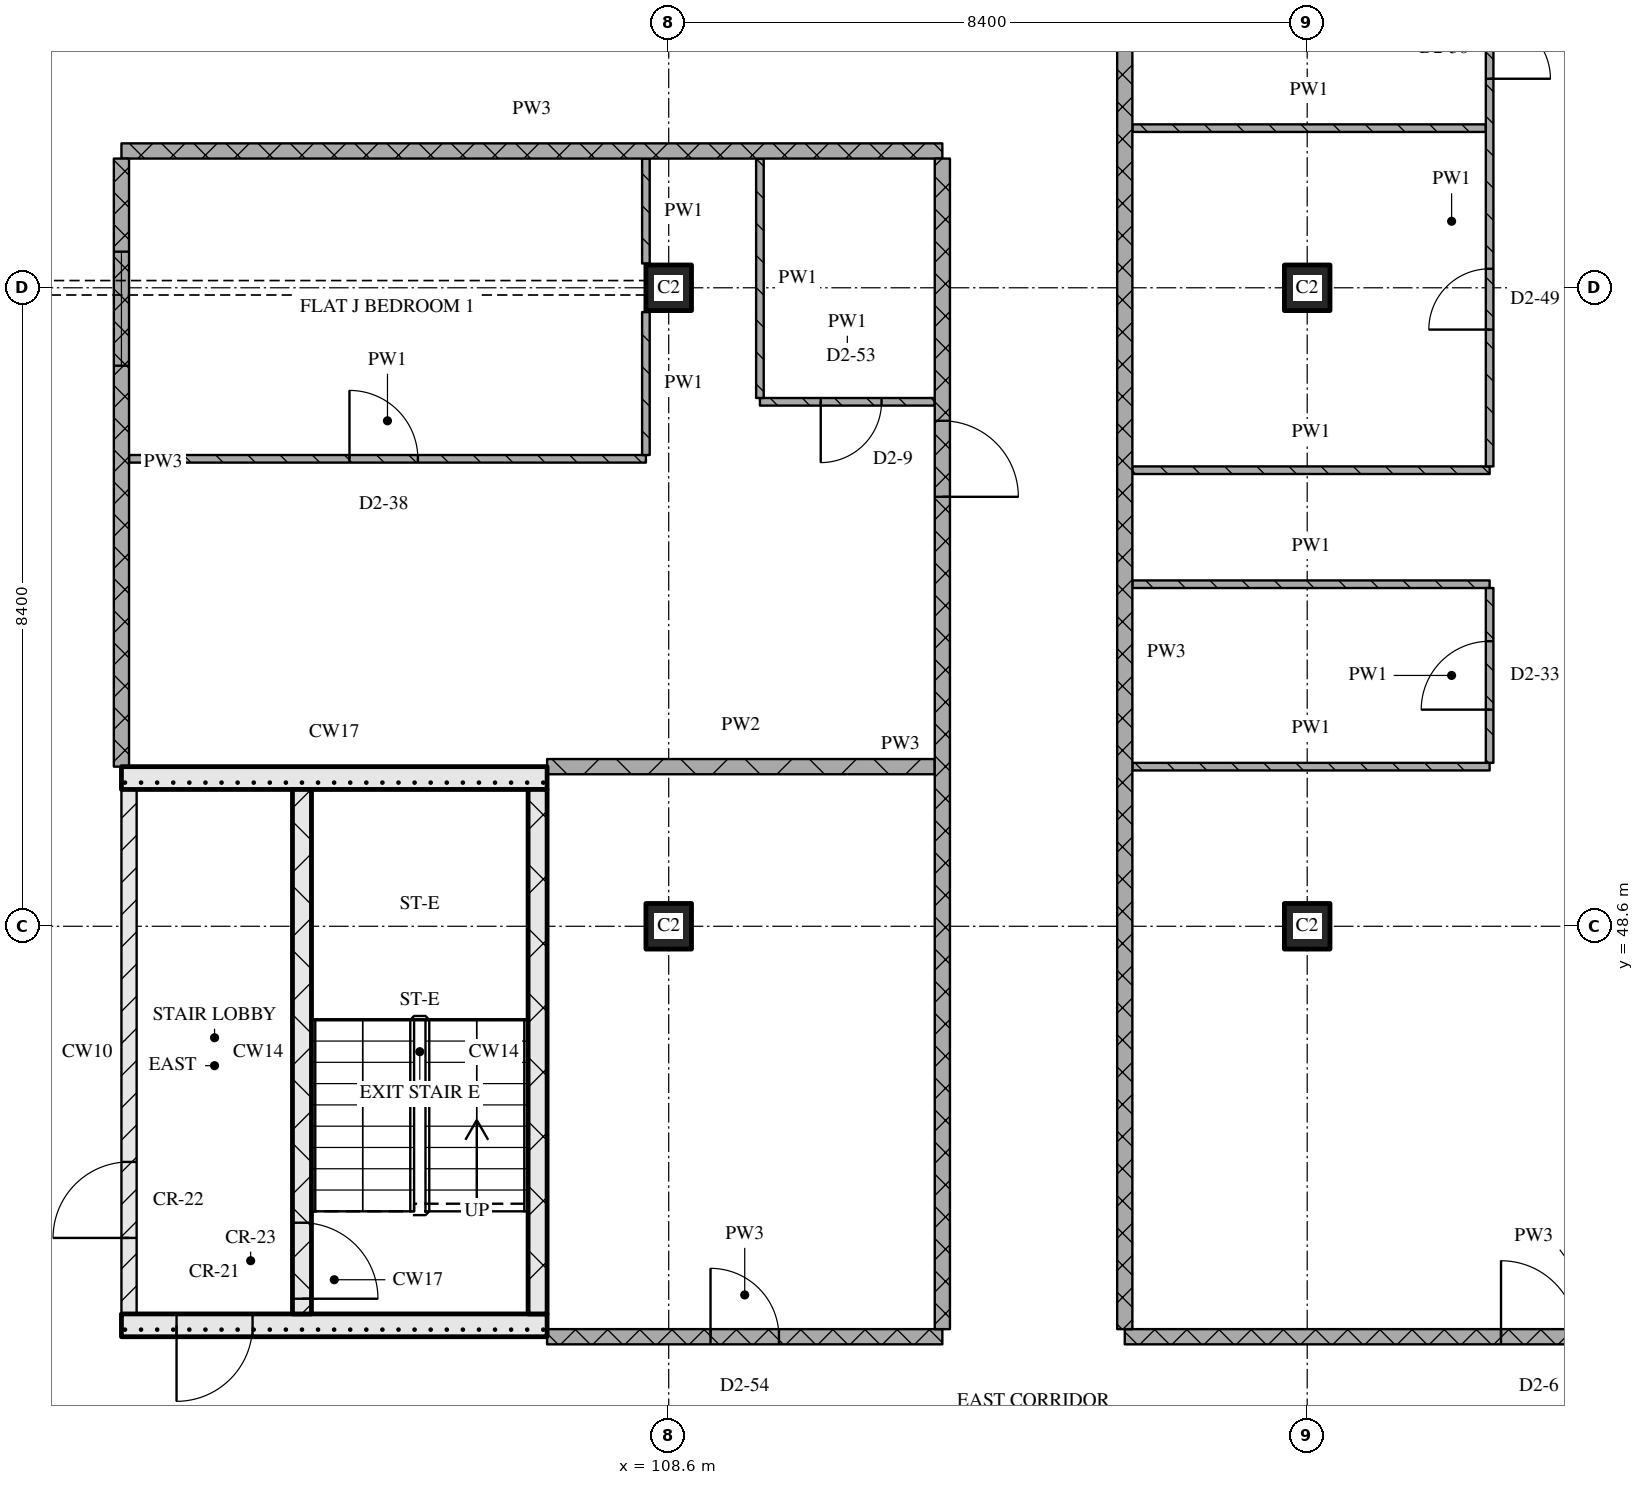
"""IFC4 building model, lengths in metres.
Left out: names, types, materials, properties, quantities, classifications, styles, units other than length and angle.
Written with IfcOpenShell. Run it as: python <this file> out.ifc"""

import sys

from ifc_helpers import new_model, si_unit, direction, frame, frame_2d, origin, origin_2d, place, context, subcontext, project, spatial, rectangle, extrude, element, fill, save


model = new_model("IFC4")
c1 = context("Model", 3, precision=1e-05, world=origin(), true_north=direction((0.0, 1.0)))
c2 = subcontext(c1, "Body", "Model", "MODEL_VIEW")
j1 = project(units=[si_unit("LENGTHUNIT", "METRE"), si_unit("PLANEANGLEUNIT", "RADIAN")], contexts=[c1])
p1 = place(None, origin())
s1 = spatial("IfcSite", under=j1, at=p1, CompositionType="ELEMENT")
p2 = place(p1, origin())
s2 = spatial("IfcBuilding", under=s1, at=p2, CompositionType="ELEMENT")
p3 = place(p2, frame((0.0, 0.0, 219.9)))
s3 = spatial("IfcBuildingStorey", under=s2, at=p3, CompositionType="ELEMENT", Elevation=219.9)
for number, where, z_axis, x_axis in (
    (1, (108.6, 48.6, 0.0), (0.0, 0.0, 1.0), (1.0, 0.0, 0.0)),
    (2, (108.6, 57.0, 0.0), (0.0, 0.0, 1.0), (1.0, 0.0, 0.0)),
    (3, (117.0, 48.6, 0.0), (0.0, 0.0, 1.0), (1.0, 0.0, 0.0)),
    (4, (117.0, 57.0, 0.0), (0.0, 0.0, 1.0), (1.0, 0.0, 0.0)),
):
    element("IfcColumn", number, at=place(p3, frame(where, z_axis=z_axis, x_axis=x_axis)), inside=s3, PredefinedType="COLUMN", context=c2, shape_type="SweptSolid", body=[
        extrude(rectangle(XDim=0.6, YDim=0.6, at=origin_2d()), origin(), (0.0, 0.0, 1.0), 3.6),
    ])
p4 = place(p3, frame((101.4, 43.35, 0.0), z_axis=(0.0, 0.0, 1.0), x_axis=(1.0, 0.0, 0.0)))
e5 = element("IfcWall", 5, at=p4, inside=s3, PredefinedType="SOLIDWALL", context=c2, shape_type="SweptSolid", body=[
    extrude(rectangle(XDim=5.6, YDim=0.3, at=frame_2d((2.8, 0.0))), origin(), (0.0, 0.0, 1.0), 3.32),
])
p5 = place(p4, frame((0.725, 0.0, 0.0)))
e6 = element("IfcOpeningElement", 6, at=p5, cuts=e5, PredefinedType="OPENING", context=c2, shape_type="SweptSolid", body=[
    extrude(rectangle(XDim=1.0, YDim=2.1, at=frame_2d((0.5, 1.05))), frame((0.0, 0.16, 0.0), z_axis=(0.0, -1.0, 0.0), x_axis=(1.0, 0.0, 0.0)), (0.0, 0.0, 1.0), 0.32),
])
p6 = place(p3, frame((101.5, 43.5, 0.0), z_axis=(0.0, 0.0, 1.0), x_axis=(0.0, 1.0, 0.0)))
e7 = element("IfcWall", 7, at=p6, inside=s3, PredefinedType="PARTITIONING", context=c2, shape_type="SweptSolid", body=[
    extrude(rectangle(XDim=6.9, YDim=0.2, at=frame_2d((3.45, 0.0))), origin(), (0.0, 0.0, 1.0), 3.32),
])
p7 = place(p6, frame((1.0, 0.0, 0.0)))
e8 = element("IfcOpeningElement", 8, at=p7, cuts=e7, PredefinedType="OPENING", context=c2, shape_type="SweptSolid", body=[
    extrude(rectangle(XDim=1.0, YDim=2.1, at=frame_2d((0.5, 1.05))), frame((0.0, 0.11, 0.0), z_axis=(0.0, -1.0, 0.0), x_axis=(1.0, 0.0, 0.0)), (0.0, 0.0, 1.0), 0.22),
])
p8 = place(p3, frame((103.775, 43.5, 0.0), z_axis=(0.0, 0.0, 1.0), x_axis=(0.0, 1.0, 0.0)))
e9 = element("IfcWall", 9, at=p8, inside=s3, PredefinedType="SOLIDWALL", context=c2, shape_type="SweptSolid", body=[
    extrude(rectangle(XDim=6.9, YDim=0.25, at=frame_2d((3.45, 0.0))), origin(), (0.0, 0.0, 1.0), 3.32),
])
p9 = place(p8, frame((0.2, 0.0, 0.0)))
e10 = element("IfcOpeningElement", 10, at=p9, cuts=e9, PredefinedType="OPENING", context=c2, shape_type="SweptSolid", body=[
    extrude(rectangle(XDim=1.0, YDim=2.1, at=frame_2d((0.5, 1.05))), frame((0.0, 0.135, 0.0), z_axis=(0.0, -1.0, 0.0), x_axis=(1.0, 0.0, 0.0)), (0.0, 0.0, 1.0), 0.27),
])
p10 = place(p3, frame((106.875, 43.5, 0.0), z_axis=(0.0, 0.0, 1.0), x_axis=(0.0, 1.0, 0.0)))
e11 = element("IfcWall", 11, at=p10, inside=s3, PredefinedType="SOLIDWALL", context=c2, shape_type="SweptSolid", body=[
    extrude(rectangle(XDim=6.9, YDim=0.25, at=frame_2d((3.45, 0.0))), origin(), (0.0, 0.0, 1.0), 3.32),
])
p11 = place(p3, frame((101.4, 50.55, 0.0), z_axis=(0.0, 0.0, 1.0), x_axis=(1.0, 0.0, 0.0)))
e12 = element("IfcWall", 12, at=p11, inside=s3, PredefinedType="SOLIDWALL", context=c2, shape_type="SweptSolid", body=[
    extrude(rectangle(XDim=5.6, YDim=0.3, at=frame_2d((2.8, 0.0))), origin(), (0.0, 0.0, 1.0), 3.32),
])
p12 = place(p3, frame((107.0, 43.2, 0.0), z_axis=(0.0, 0.0, 1.0), x_axis=(1.0, 0.0, 0.0)))
e13 = element("IfcWall", 13, at=p12, inside=s3, PredefinedType="PARTITIONING", context=c2, shape_type="SweptSolid", body=[
    extrude(rectangle(XDim=5.2, YDim=0.2, at=frame_2d((2.6, 0.0))), origin(), (0.0, 0.0, 1.0), 3.32),
])
p13 = place(p12, frame((2.15, 0.0, 0.0)))
e14 = element("IfcOpeningElement", 14, at=p13, cuts=e13, PredefinedType="OPENING", context=c2, shape_type="SweptSolid", body=[
    extrude(rectangle(XDim=0.9, YDim=2.1, at=frame_2d((0.45, 1.05))), frame((0.0, 0.11, 0.0), z_axis=(0.0, -1.0, 0.0), x_axis=(1.0, 0.0, 0.0)), (0.0, 0.0, 1.0), 0.22),
])
p14 = place(p3, frame((114.6, 43.2, 0.0), z_axis=(0.0, 0.0, 1.0), x_axis=(1.0, 0.0, 0.0)))
e15 = element("IfcWall", 15, at=p14, inside=s3, PredefinedType="PARTITIONING", context=c2, shape_type="SweptSolid", body=[
    extrude(rectangle(XDim=12.32, YDim=0.2, at=frame_2d((6.16, 0.0))), origin(), (0.0, 0.0, 1.0), 3.32),
])
p15 = place(p14, frame((4.95, 0.0, 0.0)))
e16 = element("IfcOpeningElement", 16, at=p15, cuts=e15, PredefinedType="OPENING", context=c2, shape_type="SweptSolid", body=[
    extrude(rectangle(XDim=1.0, YDim=2.1, at=frame_2d((0.5, 1.05))), frame((0.0, 0.11, 0.0), z_axis=(0.0, -1.0, 0.0), x_axis=(1.0, 0.0, 0.0)), (0.0, 0.0, 1.0), 0.22),
])
p16 = place(p3, frame((107.0, 50.7, 0.0), z_axis=(0.0, 0.0, 1.0), x_axis=(1.0, 0.0, 0.0)))
e17 = element("IfcWall", 17, at=p16, inside=s3, PredefinedType="PARTITIONING", context=c2, shape_type="SweptSolid", body=[
    extrude(rectangle(XDim=5.1, YDim=0.2, at=frame_2d((2.55, 0.0))), origin(), (0.0, 0.0, 1.0), 3.32),
])
for number, where, z_axis, x_axis in (
    (18, (114.7, 50.7, 0.0), (0.0, 0.0, 1.0), (1.0, 0.0, 0.0)),
    (19, (114.7, 53.1, 0.0), (0.0, 0.0, 1.0), (1.0, 0.0, 0.0)),
    (20, (114.7, 54.6, 0.0), (0.0, 0.0, 1.0), (1.0, 0.0, 0.0)),
):
    element("IfcWall", number, at=place(p3, frame(where, z_axis=z_axis, x_axis=x_axis)), inside=s3, PredefinedType="PARTITIONING", context=c2, shape_type="SweptSolid", body=[
        extrude(rectangle(XDim=4.7, YDim=0.1, at=frame_2d((2.35, 0.0))), origin(), (0.0, 0.0, 1.0), 3.32),
    ])
p17 = place(p3, frame((101.5, 54.75, 0.0), z_axis=(0.0, 0.0, 1.0), x_axis=(1.0, 0.0, 0.0)))
e21 = element("IfcWall", 21, at=p17, inside=s3, PredefinedType="PARTITIONING", context=c2, shape_type="SweptSolid", body=[
    extrude(rectangle(XDim=6.8, YDim=0.1, at=frame_2d((3.4, 0.0))), origin(), (0.0, 0.0, 1.0), 3.32),
])
p18 = place(p17, frame((2.9, 0.0, 0.0)))
e22 = element("IfcOpeningElement", 22, at=p18, cuts=e21, PredefinedType="OPENING", context=c2, shape_type="SweptSolid", body=[
    extrude(rectangle(XDim=0.9, YDim=2.1, at=frame_2d((0.45, 1.05))), frame((0.0, 0.06, 0.0), z_axis=(0.0, -1.0, 0.0), x_axis=(1.0, 0.0, 0.0)), (0.0, 0.0, 1.0), 0.12),
])
p19 = place(p3, frame((109.8, 55.5, 0.0), z_axis=(0.0, 0.0, 1.0), x_axis=(1.0, 0.0, 0.0)))
e23 = element("IfcWall", 23, at=p19, inside=s3, PredefinedType="PARTITIONING", context=c2, shape_type="SweptSolid", body=[
    extrude(rectangle(XDim=2.3, YDim=0.1, at=frame_2d((1.15, 0.0))), origin(), (0.0, 0.0, 1.0), 3.32),
])
p20 = place(p19, frame((0.8, 0.0, 0.0)))
e24 = element("IfcOpeningElement", 24, at=p20, cuts=e23, PredefinedType="OPENING", context=c2, shape_type="SweptSolid", body=[
    extrude(rectangle(XDim=0.8, YDim=2.1, at=frame_2d((0.4, 1.05))), frame((0.0, 0.06, 0.0), z_axis=(0.0, -1.0, 0.0), x_axis=(1.0, 0.0, 0.0)), (0.0, 0.0, 1.0), 0.12),
])
p21 = place(p3, frame((101.4, 58.8, 0.0), z_axis=(0.0, 0.0, 1.0), x_axis=(1.0, 0.0, 0.0)))
e25 = element("IfcWall", 25, at=p21, inside=s3, PredefinedType="PARTITIONING", context=c2, shape_type="SweptSolid", body=[
    extrude(rectangle(XDim=10.8, YDim=0.2, at=frame_2d((5.4, 0.0))), origin(), (0.0, 0.0, 1.0), 3.32),
])
p22 = place(p3, frame((114.7, 59.1, 0.0), z_axis=(0.0, 0.0, 1.0), x_axis=(1.0, 0.0, 0.0)))
e26 = element("IfcWall", 26, at=p22, inside=s3, PredefinedType="PARTITIONING", context=c2, shape_type="SweptSolid", body=[
    extrude(rectangle(XDim=4.65, YDim=0.1, at=frame_2d((2.325, 0.0))), origin(), (0.0, 0.0, 1.0), 3.32),
])
p23 = place(p3, frame((101.4, 58.7, 0.0), z_axis=(0.0, 0.0, 1.0), x_axis=(0.0, -1.0, 0.0)))
e27 = element("IfcWall", 27, at=p23, inside=s3, PredefinedType="PARTITIONING", context=c2, shape_type="SweptSolid", body=[
    extrude(rectangle(XDim=8.0, YDim=0.2, at=frame_2d((4.0, 0.0))), origin(), (0.0, 0.0, 1.0), 3.32),
])
p24 = place(p23, frame((1.225, 0.0, 0.9)))
e28 = element("IfcOpeningElement", 28, at=p24, cuts=e27, PredefinedType="OPENING", context=c2, shape_type="SweptSolid", body=[
    extrude(rectangle(XDim=1.5, YDim=1.5, at=frame_2d((0.75, 0.75))), frame((0.0, 0.11, 0.0), z_axis=(0.0, -1.0, 0.0), x_axis=(1.0, 0.0, 0.0)), (0.0, 0.0, 1.0), 0.22),
])
p25 = place(p3, frame((108.3, 56.68, 0.0), z_axis=(0.0, 0.0, 1.0), x_axis=(0.0, -1.0, 0.0)))
e29 = element("IfcWall", 29, at=p25, inside=s3, PredefinedType="PARTITIONING", context=c2, shape_type="SweptSolid", body=[
    extrude(rectangle(XDim=1.88, YDim=0.1, at=frame_2d((0.94, 0.0))), origin(), (0.0, 0.0, 1.0), 3.32),
])
p26 = place(p3, frame((108.3, 58.7, 0.0), z_axis=(0.0, 0.0, 1.0), x_axis=(0.0, -1.0, 0.0)))
e30 = element("IfcWall", 30, at=p26, inside=s3, PredefinedType="PARTITIONING", context=c2, shape_type="SweptSolid", body=[
    extrude(rectangle(XDim=1.38, YDim=0.1, at=frame_2d((0.69, 0.0))), origin(), (0.0, 0.0, 1.0), 3.32),
])
p27 = place(p3, frame((109.8, 58.7, 0.0), z_axis=(0.0, 0.0, 1.0), x_axis=(0.0, -1.0, 0.0)))
e31 = element("IfcWall", 31, at=p27, inside=s3, PredefinedType="PARTITIONING", context=c2, shape_type="SweptSolid", body=[
    extrude(rectangle(XDim=3.15, YDim=0.1, at=frame_2d((1.575, 0.0))), origin(), (0.0, 0.0, 1.0), 3.32),
])
p28 = place(p3, frame((112.2, 43.3, 0.0), z_axis=(0.0, 0.0, 1.0), x_axis=(0.0, 1.0, 0.0)))
e32 = element("IfcWall", 32, at=p28, inside=s3, PredefinedType="PARTITIONING", context=c2, shape_type="SweptSolid", body=[
    extrude(rectangle(XDim=15.4, YDim=0.2, at=frame_2d((7.7, 0.0))), origin(), (0.0, 0.0, 1.0), 3.32),
])
p29 = place(p28, frame((10.95, 0.0, 0.0)))
e33 = element("IfcOpeningElement", 33, at=p29, cuts=e32, PredefinedType="OPENING", context=c2, shape_type="SweptSolid", body=[
    extrude(rectangle(XDim=1.0, YDim=2.1, at=frame_2d((0.5, 1.05))), frame((0.0, 0.11, 0.0), z_axis=(0.0, -1.0, 0.0), x_axis=(1.0, 0.0, 0.0)), (0.0, 0.0, 1.0), 0.22),
])
p30 = place(p3, frame((114.6, 61.1, 0.0), z_axis=(0.0, 0.0, 1.0), x_axis=(0.0, -1.0, 0.0)))
e34 = element("IfcWall", 34, at=p30, inside=s3, PredefinedType="PARTITIONING", context=c2, shape_type="SweptSolid", body=[
    extrude(rectangle(XDim=17.8, YDim=0.2, at=frame_2d((8.9, 0.0))), origin(), (0.0, 0.0, 1.0), 3.32),
])
p31 = place(p3, frame((119.4, 50.75, 0.0), z_axis=(0.0, 0.0, 1.0), x_axis=(0.0, 1.0, 0.0)))
e35 = element("IfcWall", 35, at=p31, inside=s3, PredefinedType="PARTITIONING", context=c2, shape_type="SweptSolid", body=[
    extrude(rectangle(XDim=2.3, YDim=0.1, at=frame_2d((1.15, 0.0))), origin(), (0.0, 0.0, 1.0), 3.32),
])
p32 = place(p31, frame((0.7, 0.0, 0.0)))
e36 = element("IfcOpeningElement", 36, at=p32, cuts=e35, PredefinedType="OPENING", context=c2, shape_type="SweptSolid", body=[
    extrude(rectangle(XDim=0.9, YDim=2.1, at=frame_2d((0.45, 1.05))), frame((0.0, 0.06, 0.0), z_axis=(0.0, -1.0, 0.0), x_axis=(1.0, 0.0, 0.0)), (0.0, 0.0, 1.0), 0.12),
])
p33 = place(p3, frame((119.4, 54.65, 0.0), z_axis=(0.0, 0.0, 1.0), x_axis=(0.0, 1.0, 0.0)))
e37 = element("IfcWall", 37, at=p33, inside=s3, PredefinedType="PARTITIONING", context=c2, shape_type="SweptSolid", body=[
    extrude(rectangle(XDim=6.45, YDim=0.1, at=frame_2d((3.225, 0.0))), origin(), (0.0, 0.0, 1.0), 3.32),
])
p34 = place(p33, frame((1.8, 0.0, 0.0)))
e38 = element("IfcOpeningElement", 38, at=p34, cuts=e37, PredefinedType="OPENING", context=c2, shape_type="SweptSolid", body=[
    extrude(rectangle(XDim=0.8, YDim=2.1, at=frame_2d((0.4, 1.05))), frame((0.0, 0.06, 0.0), z_axis=(0.0, -1.0, 0.0), x_axis=(1.0, 0.0, 0.0)), (0.0, 0.0, 1.0), 0.12),
])
p35 = place(p33, frame((5.1, 0.0, 0.0)))
e39 = element("IfcOpeningElement", 39, at=p35, cuts=e37, PredefinedType="OPENING", context=c2, shape_type="SweptSolid", body=[
    extrude(rectangle(XDim=0.8, YDim=2.1, at=frame_2d((0.4, 1.05))), frame((0.0, 0.06, 0.0), z_axis=(0.0, -1.0, 0.0), x_axis=(1.0, 0.0, 0.0)), (0.0, 0.0, 1.0), 0.12),
])
p36 = place(p5, origin())
e40 = element("IfcDoor", 40, at=p36, inside=s3, OperationType="SINGLE_SWING_RIGHT", PredefinedType="DOOR", context=c2, shape_type="SweptSolid", body=[
    extrude(rectangle(XDim=1.0, YDim=2.1, at=frame_2d((0.5, 1.05))), frame((0.0, 0.025, 0.0), z_axis=(0.0, -1.0, 0.0), x_axis=(1.0, 0.0, 0.0)), (0.0, 0.0, 1.0), 0.05),
])
fill(e6, e40)
p37 = place(p9, origin())
e41 = element("IfcDoor", 41, at=p37, inside=s3, OperationType="SINGLE_SWING_RIGHT", PredefinedType="DOOR", context=c2, shape_type="SweptSolid", body=[
    extrude(rectangle(XDim=1.0, YDim=2.1, at=frame_2d((0.5, 1.05))), frame((0.0, 0.025, 0.0), z_axis=(0.0, -1.0, 0.0), x_axis=(1.0, 0.0, 0.0)), (0.0, 0.0, 1.0), 0.05),
])
fill(e10, e41)
p38 = place(p7, origin())
e42 = element("IfcDoor", 42, at=p38, inside=s3, OperationType="SINGLE_SWING_LEFT", PredefinedType="DOOR", context=c2, shape_type="SweptSolid", body=[
    extrude(rectangle(XDim=1.0, YDim=2.1, at=frame_2d((0.5, 1.05))), frame((0.0, 0.025, 0.0), z_axis=(0.0, -1.0, 0.0), x_axis=(1.0, 0.0, 0.0)), (0.0, 0.0, 1.0), 0.05),
])
fill(e8, e42)
p39 = place(p13, origin())
e43 = element("IfcDoor", 43, at=p39, inside=s3, OperationType="SINGLE_SWING_LEFT", PredefinedType="DOOR", context=c2, shape_type="SweptSolid", body=[
    extrude(rectangle(XDim=0.9, YDim=2.1, at=frame_2d((0.45, 1.05))), frame((0.0, 0.025, 0.0), z_axis=(0.0, -1.0, 0.0), x_axis=(1.0, 0.0, 0.0)), (0.0, 0.0, 1.0), 0.05),
])
fill(e14, e43)
p40 = place(p15, origin())
e44 = element("IfcDoor", 44, at=p40, inside=s3, OperationType="SINGLE_SWING_LEFT", PredefinedType="DOOR", context=c2, shape_type="SweptSolid", body=[
    extrude(rectangle(XDim=1.0, YDim=2.1, at=frame_2d((0.5, 1.05))), frame((0.0, 0.025, 0.0), z_axis=(0.0, -1.0, 0.0), x_axis=(1.0, 0.0, 0.0)), (0.0, 0.0, 1.0), 0.05),
])
fill(e16, e44)
p41 = place(p18, origin())
e45 = element("IfcDoor", 45, at=p41, inside=s3, OperationType="SINGLE_SWING_LEFT", PredefinedType="DOOR", context=c2, shape_type="SweptSolid", body=[
    extrude(rectangle(XDim=0.9, YDim=2.1, at=frame_2d((0.45, 1.05))), frame((0.0, 0.025, 0.0), z_axis=(0.0, -1.0, 0.0), x_axis=(1.0, 0.0, 0.0)), (0.0, 0.0, 1.0), 0.05),
])
fill(e22, e45)
p42 = place(p20, origin())
e46 = element("IfcDoor", 46, at=p42, inside=s3, OperationType="SINGLE_SWING_RIGHT", PredefinedType="DOOR", context=c2, shape_type="SweptSolid", body=[
    extrude(rectangle(XDim=0.8, YDim=2.1, at=frame_2d((0.4, 1.05))), frame((0.0, 0.025, 0.0), z_axis=(0.0, -1.0, 0.0), x_axis=(1.0, 0.0, 0.0)), (0.0, 0.0, 1.0), 0.05),
])
fill(e24, e46)
p43 = place(p29, origin())
e47 = element("IfcDoor", 47, at=p43, inside=s3, OperationType="SINGLE_SWING_RIGHT", PredefinedType="DOOR", context=c2, shape_type="SweptSolid", body=[
    extrude(rectangle(XDim=1.0, YDim=2.1, at=frame_2d((0.5, 1.05))), frame((0.0, 0.025, 0.0), z_axis=(0.0, -1.0, 0.0), x_axis=(1.0, 0.0, 0.0)), (0.0, 0.0, 1.0), 0.05),
])
fill(e33, e47)
p44 = place(p32, origin())
e48 = element("IfcDoor", 48, at=p44, inside=s3, OperationType="SINGLE_SWING_LEFT", PredefinedType="DOOR", context=c2, shape_type="SweptSolid", body=[
    extrude(rectangle(XDim=0.9, YDim=2.1, at=frame_2d((0.45, 1.05))), frame((0.0, 0.025, 0.0), z_axis=(0.0, -1.0, 0.0), x_axis=(1.0, 0.0, 0.0)), (0.0, 0.0, 1.0), 0.05),
])
fill(e36, e48)
p45 = place(p34, origin())
e49 = element("IfcDoor", 49, at=p45, inside=s3, OperationType="SINGLE_SWING_LEFT", PredefinedType="DOOR", context=c2, shape_type="SweptSolid", body=[
    extrude(rectangle(XDim=0.8, YDim=2.1, at=frame_2d((0.4, 1.05))), frame((0.0, 0.025, 0.0), z_axis=(0.0, -1.0, 0.0), x_axis=(1.0, 0.0, 0.0)), (0.0, 0.0, 1.0), 0.05),
])
fill(e38, e49)
p46 = place(p35, origin())
e50 = element("IfcDoor", 50, at=p46, inside=s3, OperationType="SINGLE_SWING_RIGHT", PredefinedType="DOOR", context=c2, shape_type="SweptSolid", body=[
    extrude(rectangle(XDim=0.8, YDim=2.1, at=frame_2d((0.4, 1.05))), frame((0.0, 0.025, 0.0), z_axis=(0.0, -1.0, 0.0), x_axis=(1.0, 0.0, 0.0)), (0.0, 0.0, 1.0), 0.05),
])
fill(e39, e50)
p47 = place(p24, origin())
e51 = element("IfcWindow", 51, at=p47, inside=s3, PartitioningType="SINGLE_PANEL", PredefinedType="WINDOW", context=c2, shape_type="SweptSolid", body=[
    extrude(rectangle(XDim=1.5, YDim=1.5, at=frame_2d((0.75, 0.75))), frame((0.0, 0.03, 0.0), z_axis=(0.0, -1.0, 0.0), x_axis=(1.0, 0.0, 0.0)), (0.0, 0.0, 1.0), 0.06),
])
fill(e28, e51)
save(model, sys.argv[1])
